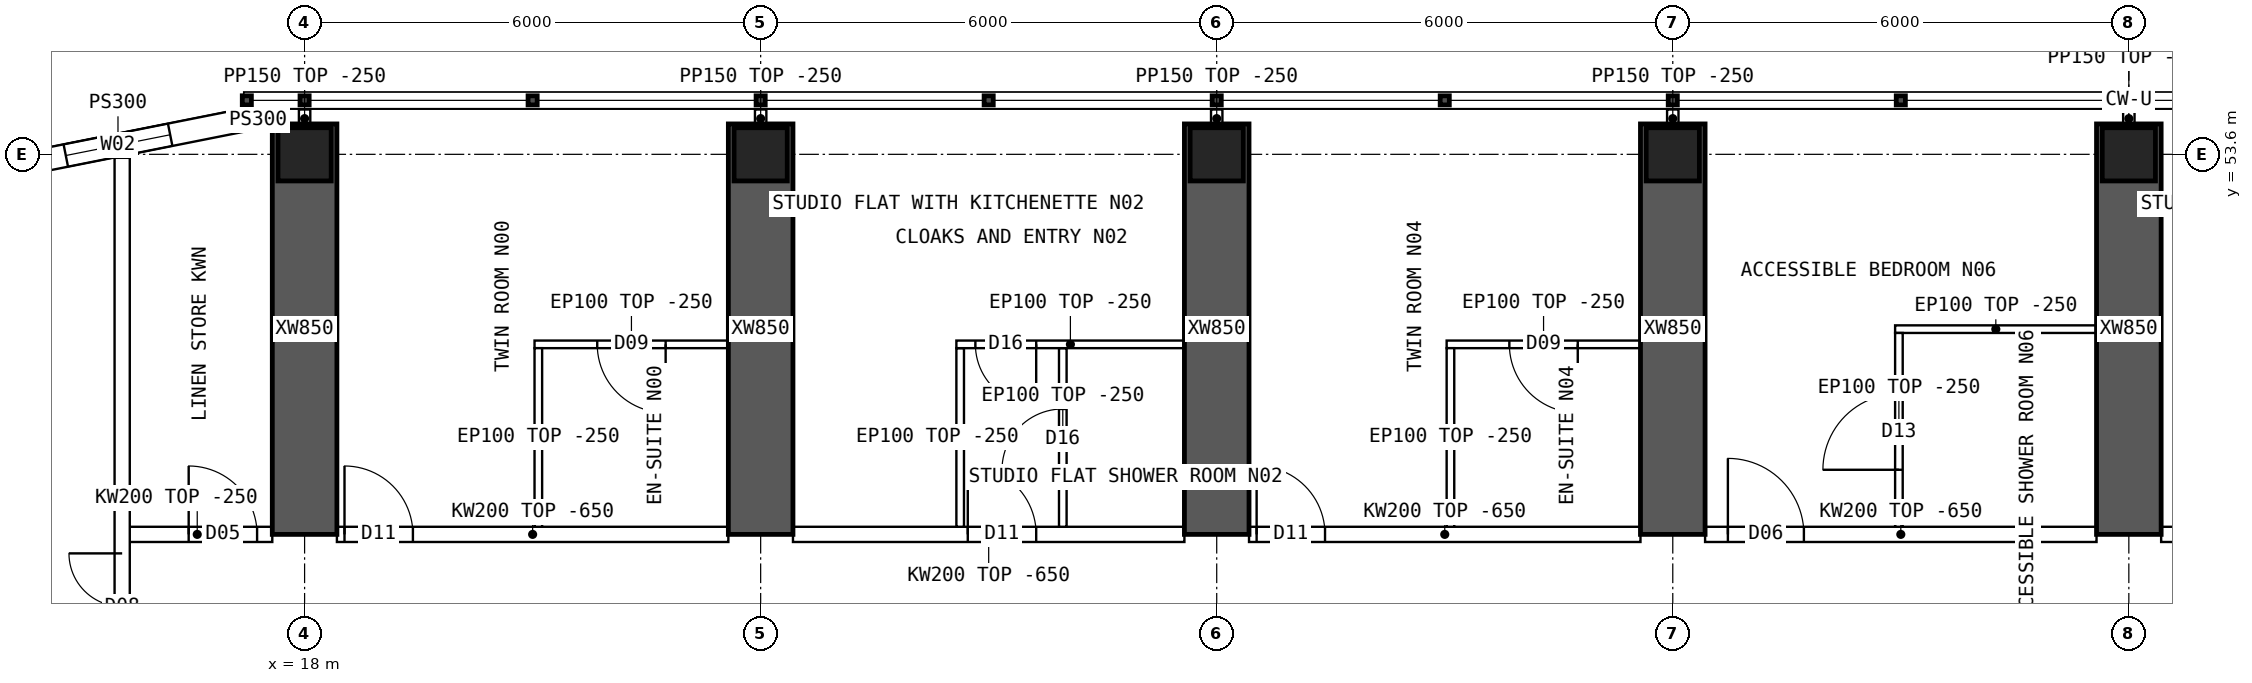
"""IFC4 building model, lengths in metres.
Left out: names, types, materials, properties, quantities, classifications, styles, units other than length and angle.
Written with IfcOpenShell. Run it as: python <this file> out.ifc"""

import sys

from ifc_helpers import new_model, si_unit, direction, frame, frame_2d, origin, origin_2d, place, context, subcontext, project, spatial, polyline, rectangle, hollow_rectangle, outline, extrude, element, fill, save


model = new_model("IFC4")
c1 = context("Model", 3, precision=1e-05, world=origin(), true_north=direction((0.0, 1.0)))
c2 = subcontext(c1, "Body", "Model", "MODEL_VIEW")
j1 = project(units=[si_unit("LENGTHUNIT", "METRE"), si_unit("PLANEANGLEUNIT", "RADIAN")], contexts=[c1])
p1 = place(None, origin())
s1 = spatial("IfcSite", under=j1, at=p1, CompositionType="ELEMENT")
p2 = place(p1, origin())
s2 = spatial("IfcBuilding", under=s1, at=p2, CompositionType="ELEMENT")
p3 = place(p2, frame((0.0, 0.0, 152.35)))
s3 = spatial("IfcBuildingStorey", under=s2, at=p3, CompositionType="ELEMENT", Elevation=152.35)
for number, where, z_axis, x_axis in (
    (1, (18.0, 53.6, 0.0), (0.0, 0.0, 1.0), (1.0, 0.0, 0.0)),
    (2, (24.0, 53.6, 0.0), (0.0, 0.0, 1.0), (1.0, 0.0, 0.0)),
    (3, (30.0, 53.6, 0.0), (0.0, 0.0, 1.0), (1.0, 0.0, 0.0)),
    (4, (36.0, 53.6, 0.0), (0.0, 0.0, 1.0), (1.0, 0.0, 0.0)),
    (5, (42.0, 53.6, 0.0), (0.0, 0.0, 1.0), (1.0, 0.0, 0.0)),
):
    element("IfcColumn", number, at=place(p3, frame(where, z_axis=z_axis, x_axis=x_axis)), inside=s3, PredefinedType="COLUMN", context=c2, shape_type="SweptSolid", body=[
        extrude(hollow_rectangle(XDim=0.7, YDim=0.7, WallThickness=0.07, at=origin_2d()), origin(), (0.0, 0.0, 1.0), 3.75),
    ])
for number, where, z_axis, x_axis in (
    (6, (18.0, 48.6, 0.0), (0.0, 0.0, 1.0), (0.0, 1.0, 0.0)),
    (7, (24.0, 48.6, 0.0), (0.0, 0.0, 1.0), (0.0, 1.0, 0.0)),
    (8, (30.0, 48.6, 0.0), (0.0, 0.0, 1.0), (0.0, 1.0, 0.0)),
    (9, (36.0, 48.6, 0.0), (0.0, 0.0, 1.0), (0.0, 1.0, 0.0)),
    (10, (42.0, 48.6, 0.0), (0.0, 0.0, 1.0), (0.0, 1.0, 0.0)),
):
    element("IfcWall", number, at=place(p3, frame(where, z_axis=z_axis, x_axis=x_axis)), inside=s3, PredefinedType="SHEAR", context=c2, shape_type="SweptSolid", body=[
        extrude(rectangle(XDim=5.4, YDim=0.85, at=frame_2d((2.7, 0.0))), origin(), (0.0, 0.0, 1.0), 3.75),
    ])
p4 = place(p3, frame((17.2, 54.05, 0.0), z_axis=(0.0, 0.0, 1.0), x_axis=(-0.98078325777, -0.195100490205, 0.0)))
e11 = element("IfcWall", 11, at=p4, inside=s3, PredefinedType="SOLIDWALL", context=c2, shape_type="SweptSolid", body=[
    extrude(outline(polyline([(-0.03, -0.15), (3.405, -0.15), (3.345, 0.15), (0.03, 0.15), (-0.03, -0.15)])), origin(), (0.0, 0.0, 1.0), 3.5),
])
p5 = place(p4, frame((0.988, 0.0, 0.9)))
e12 = element("IfcOpeningElement", 12, at=p5, cuts=e11, PredefinedType="OPENING", context=c2, shape_type="SweptSolid", body=[
    extrude(rectangle(XDim=1.4, YDim=1.8, at=frame_2d((0.7, 0.9))), frame((0.0, 0.16, 0.0), z_axis=(0.0, -1.0, 0.0), x_axis=(1.0, 0.0, 0.0)), (0.0, 0.0, 1.0), 0.32),
])
p6 = place(p3, frame((17.2, 54.05, 0.0), z_axis=(0.0, 0.0, 1.0), x_axis=(1.0, 0.0, 0.0)))
e13 = element("IfcWall", 13, at=p6, inside=s3, PredefinedType="SOLIDWALL", context=c2, shape_type="SweptSolid", body=[
    extrude(rectangle(XDim=0.375, YDim=0.3, at=frame_2d((0.188, 0.0))), origin(), (0.0, 0.0, 1.0), 3.5),
])
p7 = place(p3, frame((15.6, 48.6, 0.0), z_axis=(0.0, 0.0, 1.0), x_axis=(1.0, 0.0, 0.0)))
e14 = element("IfcWall", 14, at=p7, inside=s3, PredefinedType="SOLIDWALL", context=c2, shape_type="SweptSolid", body=[
    extrude(rectangle(XDim=1.975, YDim=0.2, at=frame_2d((0.987, 0.0))), origin(), (0.0, 0.0, 1.0), 3.5),
])
p8 = place(p7, frame((0.875, 0.0, 0.0)))
e15 = element("IfcOpeningElement", 15, at=p8, cuts=e14, PredefinedType="OPENING", context=c2, shape_type="SweptSolid", body=[
    extrude(rectangle(XDim=0.9, YDim=2.1, at=frame_2d((0.45, 1.05))), frame((0.0, 0.11, 0.0), z_axis=(0.0, -1.0, 0.0), x_axis=(1.0, 0.0, 0.0)), (0.0, 0.0, 1.0), 0.22),
])
p9 = place(p3, frame((18.425, 48.6, 0.0), z_axis=(0.0, 0.0, 1.0), x_axis=(1.0, 0.0, 0.0)))
e16 = element("IfcWall", 16, at=p9, inside=s3, PredefinedType="SOLIDWALL", context=c2, shape_type="SweptSolid", body=[
    extrude(outline(polyline([(0.0, 0.0), (5.15, 0.0), (5.15, 3.1), (0.0, 3.1), (0.0, 0.0)])), frame((0.0, 0.1, 0.0), z_axis=(0.0, -1.0, 0.0), x_axis=(1.0, 0.0, 0.0)), (0.0, 0.0, 1.0), 0.2),
])
p10 = place(p9, frame((0.1, 0.0, 0.0)))
e17 = element("IfcOpeningElement", 17, at=p10, cuts=e16, PredefinedType="OPENING", context=c2, shape_type="SweptSolid", body=[
    extrude(rectangle(XDim=0.9, YDim=2.1, at=frame_2d((0.45, 1.05))), frame((0.0, 0.11, 0.0), z_axis=(0.0, -1.0, 0.0), x_axis=(1.0, 0.0, 0.0)), (0.0, 0.0, 1.0), 0.22),
])
p11 = place(p3, frame((24.425, 48.6, 0.0), z_axis=(0.0, 0.0, 1.0), x_axis=(1.0, 0.0, 0.0)))
e18 = element("IfcWall", 18, at=p11, inside=s3, PredefinedType="SOLIDWALL", context=c2, shape_type="SweptSolid", body=[
    extrude(outline(polyline([(0.0, 0.0), (5.15, 0.0), (5.15, 3.1), (0.0, 3.1), (0.0, 0.0)])), frame((0.0, 0.1, 0.0), z_axis=(0.0, -1.0, 0.0), x_axis=(1.0, 0.0, 0.0)), (0.0, 0.0, 1.0), 0.2),
])
p12 = place(p11, frame((2.3, 0.0, 0.0)))
e19 = element("IfcOpeningElement", 19, at=p12, cuts=e18, PredefinedType="OPENING", context=c2, shape_type="SweptSolid", body=[
    extrude(rectangle(XDim=0.9, YDim=2.1, at=frame_2d((0.45, 1.05))), frame((0.0, 0.11, 0.0), z_axis=(0.0, -1.0, 0.0), x_axis=(1.0, 0.0, 0.0)), (0.0, 0.0, 1.0), 0.22),
])
p13 = place(p3, frame((30.425, 48.6, 0.0), z_axis=(0.0, 0.0, 1.0), x_axis=(1.0, 0.0, 0.0)))
e20 = element("IfcWall", 20, at=p13, inside=s3, PredefinedType="SOLIDWALL", context=c2, shape_type="SweptSolid", body=[
    extrude(outline(polyline([(0.0, 0.0), (5.15, 0.0), (5.15, 3.1), (0.0, 3.1), (0.0, 0.0)])), frame((0.0, 0.1, 0.0), z_axis=(0.0, -1.0, 0.0), x_axis=(1.0, 0.0, 0.0)), (0.0, 0.0, 1.0), 0.2),
])
p14 = place(p13, frame((0.1, 0.0, 0.0)))
e21 = element("IfcOpeningElement", 21, at=p14, cuts=e20, PredefinedType="OPENING", context=c2, shape_type="SweptSolid", body=[
    extrude(rectangle(XDim=0.9, YDim=2.1, at=frame_2d((0.45, 1.05))), frame((0.0, 0.11, 0.0), z_axis=(0.0, -1.0, 0.0), x_axis=(1.0, 0.0, 0.0)), (0.0, 0.0, 1.0), 0.22),
])
p15 = place(p3, frame((36.425, 48.6, 0.0), z_axis=(0.0, 0.0, 1.0), x_axis=(1.0, 0.0, 0.0)))
e22 = element("IfcWall", 22, at=p15, inside=s3, PredefinedType="SOLIDWALL", context=c2, shape_type="SweptSolid", body=[
    extrude(outline(polyline([(0.0, 0.0), (5.15, 0.0), (5.15, 3.1), (0.0, 3.1), (0.0, 0.0)])), frame((0.0, 0.1, 0.0), z_axis=(0.0, -1.0, 0.0), x_axis=(1.0, 0.0, 0.0)), (0.0, 0.0, 1.0), 0.2),
])
p16 = place(p15, frame((0.3, 0.0, 0.0)))
e23 = element("IfcOpeningElement", 23, at=p16, cuts=e22, PredefinedType="OPENING", context=c2, shape_type="SweptSolid", body=[
    extrude(rectangle(XDim=1.0, YDim=2.1, at=frame_2d((0.5, 1.05))), frame((0.0, 0.11, 0.0), z_axis=(0.0, -1.0, 0.0), x_axis=(1.0, 0.0, 0.0)), (0.0, 0.0, 1.0), 0.22),
])
p17 = place(p3, frame((42.425, 48.6, 0.0), z_axis=(0.0, 0.0, 1.0), x_axis=(1.0, 0.0, 0.0)))
e24 = element("IfcWall", 24, at=p17, inside=s3, PredefinedType="SOLIDWALL", context=c2, shape_type="SweptSolid", body=[
    extrude(outline(polyline([(0.0, 0.0), (5.15, 0.0), (5.15, 3.1), (0.0, 3.1), (0.0, 0.0)])), frame((0.0, 0.1, 0.0), z_axis=(0.0, -1.0, 0.0), x_axis=(1.0, 0.0, 0.0)), (0.0, 0.0, 1.0), 0.2),
])
p18 = place(p17, frame((2.3, 0.0, 0.0)))
e25 = element("IfcOpeningElement", 25, at=p18, cuts=e24, PredefinedType="OPENING", context=c2, shape_type="SweptSolid", body=[
    extrude(rectangle(XDim=0.9, YDim=2.1, at=frame_2d((0.45, 1.05))), frame((0.0, 0.11, 0.0), z_axis=(0.0, -1.0, 0.0), x_axis=(1.0, 0.0, 0.0)), (0.0, 0.0, 1.0), 0.22),
])
p19 = place(p3, frame((21.025, 51.1, 0.0), z_axis=(0.0, 0.0, 1.0), x_axis=(1.0, 0.0, 0.0)))
e26 = element("IfcWall", 26, at=p19, inside=s3, PredefinedType="PARTITIONING", context=c2, shape_type="SweptSolid", body=[
    extrude(rectangle(XDim=2.55, YDim=0.1, at=frame_2d((1.275, 0.0))), origin(), (0.0, 0.0, 1.0), 3.5),
])
p20 = place(p19, frame((0.825, 0.0, 0.0)))
e27 = element("IfcOpeningElement", 27, at=p20, cuts=e26, PredefinedType="OPENING", context=c2, shape_type="SweptSolid", body=[
    extrude(rectangle(XDim=0.9, YDim=2.1, at=frame_2d((0.45, 1.05))), frame((0.0, 0.06, 0.0), z_axis=(0.0, -1.0, 0.0), x_axis=(1.0, 0.0, 0.0)), (0.0, 0.0, 1.0), 0.12),
])
p21 = place(p3, frame((21.075, 51.05, 0.0), z_axis=(0.0, 0.0, 1.0), x_axis=(0.0, -1.0, 0.0)))
e28 = element("IfcWall", 28, at=p21, inside=s3, PredefinedType="PARTITIONING", context=c2, shape_type="SweptSolid", body=[
    extrude(outline(polyline([(0.0, 0.0), (2.35, 0.0), (2.35, 3.1), (2.302, 3.1), (2.3, 3.5), (0.0, 3.5), (0.0, 0.0)])), frame((0.0, 0.05, 0.0), z_axis=(0.0, -1.0, 0.0), x_axis=(1.0, 0.0, 0.0)), (0.0, 0.0, 1.0), 0.1),
])
p22 = place(p3, frame((26.575, 51.1, 0.0), z_axis=(0.0, 0.0, 1.0), x_axis=(1.0, 0.0, 0.0)))
e29 = element("IfcWall", 29, at=p22, inside=s3, PredefinedType="PARTITIONING", context=c2, shape_type="SweptSolid", body=[
    extrude(rectangle(XDim=3.0, YDim=0.1, at=frame_2d((1.5, 0.0))), origin(), (0.0, 0.0, 1.0), 3.5),
])
p23 = place(p22, frame((0.25, 0.0, 0.0)))
e30 = element("IfcOpeningElement", 30, at=p23, cuts=e29, PredefinedType="OPENING", context=c2, shape_type="SweptSolid", body=[
    extrude(rectangle(XDim=0.8, YDim=2.1, at=frame_2d((0.4, 1.05))), frame((0.0, 0.06, 0.0), z_axis=(0.0, -1.0, 0.0), x_axis=(1.0, 0.0, 0.0)), (0.0, 0.0, 1.0), 0.12),
])
p24 = place(p3, frame((26.625, 51.05, 0.0), z_axis=(0.0, 0.0, 1.0), x_axis=(0.0, -1.0, 0.0)))
e31 = element("IfcWall", 31, at=p24, inside=s3, PredefinedType="PARTITIONING", context=c2, shape_type="SweptSolid", body=[
    extrude(outline(polyline([(0.0, 0.0), (2.35, 0.0), (2.35, 3.1), (2.302, 3.1), (2.3, 3.5), (0.0, 3.5), (0.0, 0.0)])), frame((0.0, 0.05, 0.0), z_axis=(0.0, -1.0, 0.0), x_axis=(1.0, 0.0, 0.0)), (0.0, 0.0, 1.0), 0.1),
])
p25 = place(p3, frame((27.975, 51.05, 0.0), z_axis=(0.0, 0.0, 1.0), x_axis=(0.0, -1.0, 0.0)))
e32 = element("IfcWall", 32, at=p25, inside=s3, PredefinedType="PARTITIONING", context=c2, shape_type="SweptSolid", body=[
    extrude(outline(polyline([(0.0, 0.0), (2.35, 0.0), (2.35, 3.1), (2.302, 3.1), (2.3, 3.5), (0.0, 3.5), (0.0, 0.0)])), frame((0.0, 0.05, 0.0), z_axis=(0.0, -1.0, 0.0), x_axis=(1.0, 0.0, 0.0)), (0.0, 0.0, 1.0), 0.1),
])
p26 = place(p25, frame((0.8, 0.0, 0.0)))
e33 = element("IfcOpeningElement", 33, at=p26, cuts=e32, PredefinedType="OPENING", context=c2, shape_type="SweptSolid", body=[
    extrude(rectangle(XDim=0.8, YDim=2.1, at=frame_2d((0.4, 1.05))), frame((0.0, 0.06, 0.0), z_axis=(0.0, -1.0, 0.0), x_axis=(1.0, 0.0, 0.0)), (0.0, 0.0, 1.0), 0.12),
])
p27 = place(p3, frame((33.025, 51.1, 0.0), z_axis=(0.0, 0.0, 1.0), x_axis=(1.0, 0.0, 0.0)))
e34 = element("IfcWall", 34, at=p27, inside=s3, PredefinedType="PARTITIONING", context=c2, shape_type="SweptSolid", body=[
    extrude(rectangle(XDim=2.55, YDim=0.1, at=frame_2d((1.275, 0.0))), origin(), (0.0, 0.0, 1.0), 3.5),
])
p28 = place(p27, frame((0.825, 0.0, 0.0)))
e35 = element("IfcOpeningElement", 35, at=p28, cuts=e34, PredefinedType="OPENING", context=c2, shape_type="SweptSolid", body=[
    extrude(rectangle(XDim=0.9, YDim=2.1, at=frame_2d((0.45, 1.05))), frame((0.0, 0.06, 0.0), z_axis=(0.0, -1.0, 0.0), x_axis=(1.0, 0.0, 0.0)), (0.0, 0.0, 1.0), 0.12),
])
p29 = place(p3, frame((33.075, 51.05, 0.0), z_axis=(0.0, 0.0, 1.0), x_axis=(0.0, -1.0, 0.0)))
e36 = element("IfcWall", 36, at=p29, inside=s3, PredefinedType="PARTITIONING", context=c2, shape_type="SweptSolid", body=[
    extrude(outline(polyline([(0.0, 0.0), (2.35, 0.0), (2.35, 3.1), (2.302, 3.1), (2.3, 3.5), (0.0, 3.5), (0.0, 0.0)])), frame((0.0, 0.05, 0.0), z_axis=(0.0, -1.0, 0.0), x_axis=(1.0, 0.0, 0.0)), (0.0, 0.0, 1.0), 0.1),
])
p30 = place(p3, frame((38.925, 51.3, 0.0), z_axis=(0.0, 0.0, 1.0), x_axis=(1.0, 0.0, 0.0)))
e37 = element("IfcWall", 37, at=p30, inside=s3, PredefinedType="PARTITIONING", context=c2, shape_type="SweptSolid", body=[
    extrude(rectangle(XDim=2.65, YDim=0.1, at=frame_2d((1.325, 0.0))), origin(), (0.0, 0.0, 1.0), 3.5),
])
p31 = place(p3, frame((38.975, 51.25, 0.0), z_axis=(0.0, 0.0, 1.0), x_axis=(0.0, -1.0, 0.0)))
e38 = element("IfcWall", 38, at=p31, inside=s3, PredefinedType="PARTITIONING", context=c2, shape_type="SweptSolid", body=[
    extrude(outline(polyline([(0.0, 0.0), (2.55, 0.0), (2.55, 3.1), (2.502, 3.1), (2.5, 3.5), (0.0, 3.5), (0.0, 0.0)])), frame((0.0, 0.05, 0.0), z_axis=(0.0, -1.0, 0.0), x_axis=(1.0, 0.0, 0.0)), (0.0, 0.0, 1.0), 0.1),
])
p32 = place(p31, frame((0.8, 0.0, 0.0)))
e39 = element("IfcOpeningElement", 39, at=p32, cuts=e38, PredefinedType="OPENING", context=c2, shape_type="SweptSolid", body=[
    extrude(rectangle(XDim=1.0, YDim=2.1, at=frame_2d((0.5, 1.05))), frame((0.0, 0.06, 0.0), z_axis=(0.0, -1.0, 0.0), x_axis=(1.0, 0.0, 0.0)), (0.0, 0.0, 1.0), 0.12),
])
p33 = place(p3, frame((15.6, 10.446, 0.0), z_axis=(0.0, 0.0, 1.0), x_axis=(0.0, 1.0, 0.0)))
e40 = element("IfcWall", 40, at=p33, inside=s3, PredefinedType="SOLIDWALL", context=c2, shape_type="SweptSolid", body=[
    extrude(rectangle(XDim=43.107, YDim=0.2, at=frame_2d((21.554, 0.0))), origin(), (0.0, 0.0, 1.0), 3.5),
])
p34 = place(p33, frame((5.104, 0.0, 0.0)))
e41 = element("IfcOpeningElement", 41, at=p34, cuts=e40, PredefinedType="OPENING", context=c2, shape_type="SweptSolid", body=[
    extrude(rectangle(XDim=1.4, YDim=2.1, at=frame_2d((0.7, 1.05))), frame((0.0, 0.11, 0.0), z_axis=(0.0, -1.0, 0.0), x_axis=(1.0, 0.0, 0.0)), (0.0, 0.0, 1.0), 0.22),
])
p35 = place(p33, frame((36.504, 0.0, 0.0)))
e42 = element("IfcOpeningElement", 42, at=p35, cuts=e40, PredefinedType="OPENING", context=c2, shape_type="SweptSolid", body=[
    extrude(rectangle(XDim=1.4, YDim=2.1, at=frame_2d((0.7, 1.05))), frame((0.0, 0.11, 0.0), z_axis=(0.0, -1.0, 0.0), x_axis=(1.0, 0.0, 0.0)), (0.0, 0.0, 1.0), 0.22),
])
for number, where, z_axis, x_axis in (
    (43, (18.0, 53.95, 0.0), (0.0, 0.0, 1.0), (0.0, 1.0, 0.0)),
    (44, (24.0, 53.95, 0.0), (0.0, 0.0, 1.0), (0.0, 1.0, 0.0)),
    (45, (30.0, 53.95, 0.0), (0.0, 0.0, 1.0), (0.0, 1.0, 0.0)),
    (46, (36.0, 53.95, 0.0), (0.0, 0.0, 1.0), (0.0, 1.0, 0.0)),
    (47, (42.0, 53.95, 0.0), (0.0, 0.0, 1.0), (0.0, 1.0, 0.0)),
):
    element("IfcWall", number, at=place(p3, frame(where, z_axis=z_axis, x_axis=x_axis)), inside=s3, PredefinedType="PARTITIONING", context=c2, shape_type="SweptSolid", body=[
        extrude(rectangle(XDim=0.24, YDim=0.15, at=frame_2d((0.12, 0.0))), origin(), (0.0, 0.0, 1.0), 3.5),
    ])
p36 = place(p5, origin())
e48 = element("IfcWindow", 48, at=p36, inside=s3, PartitioningType="SINGLE_PANEL", PredefinedType="WINDOW", context=c2, shape_type="SweptSolid", body=[
    extrude(rectangle(XDim=1.4, YDim=1.8, at=frame_2d((0.7, 0.9))), frame((0.0, 0.03, 0.0), z_axis=(0.0, -1.0, 0.0), x_axis=(1.0, 0.0, 0.0)), (0.0, 0.0, 1.0), 0.06),
])
fill(e12, e48)
p37 = place(p20, origin())
e49 = element("IfcDoor", 49, at=p37, inside=s3, OperationType="SINGLE_SWING_RIGHT", PredefinedType="DOOR", context=c2, shape_type="SweptSolid", body=[
    extrude(rectangle(XDim=0.9, YDim=2.1, at=frame_2d((0.45, 1.05))), frame((0.0, 0.025, 0.0), z_axis=(0.0, -1.0, 0.0), x_axis=(1.0, 0.0, 0.0)), (0.0, 0.0, 1.0), 0.05),
])
fill(e27, e49)
p38 = place(p10, origin())
e50 = element("IfcDoor", 50, at=p38, inside=s3, OperationType="SINGLE_SWING_LEFT", PredefinedType="DOOR", context=c2, shape_type="SweptSolid", body=[
    extrude(rectangle(XDim=0.9, YDim=2.1, at=frame_2d((0.45, 1.05))), frame((0.0, 0.025, 0.0), z_axis=(0.0, -1.0, 0.0), x_axis=(1.0, 0.0, 0.0)), (0.0, 0.0, 1.0), 0.05),
])
fill(e17, e50)
p39 = place(p23, origin())
e51 = element("IfcDoor", 51, at=p39, inside=s3, OperationType="SINGLE_SWING_RIGHT", PredefinedType="DOOR", context=c2, shape_type="SweptSolid", body=[
    extrude(rectangle(XDim=0.8, YDim=2.1, at=frame_2d((0.4, 1.05))), frame((0.0, 0.025, 0.0), z_axis=(0.0, -1.0, 0.0), x_axis=(1.0, 0.0, 0.0)), (0.0, 0.0, 1.0), 0.05),
])
fill(e30, e51)
p40 = place(p26, origin())
e52 = element("IfcDoor", 52, at=p40, inside=s3, OperationType="SINGLE_SWING_RIGHT", PredefinedType="DOOR", context=c2, shape_type="SweptSolid", body=[
    extrude(rectangle(XDim=0.8, YDim=2.1, at=frame_2d((0.4, 1.05))), frame((0.0, 0.025, 0.0), z_axis=(0.0, -1.0, 0.0), x_axis=(1.0, 0.0, 0.0)), (0.0, 0.0, 1.0), 0.05),
])
fill(e33, e52)
p41 = place(p12, origin())
e53 = element("IfcDoor", 53, at=p41, inside=s3, OperationType="SINGLE_SWING_LEFT", PredefinedType="DOOR", context=c2, shape_type="SweptSolid", body=[
    extrude(rectangle(XDim=0.9, YDim=2.1, at=frame_2d((0.45, 1.05))), frame((0.0, 0.025, 0.0), z_axis=(0.0, -1.0, 0.0), x_axis=(1.0, 0.0, 0.0)), (0.0, 0.0, 1.0), 0.05),
])
fill(e19, e53)
p42 = place(p28, origin())
e54 = element("IfcDoor", 54, at=p42, inside=s3, OperationType="SINGLE_SWING_RIGHT", PredefinedType="DOOR", context=c2, shape_type="SweptSolid", body=[
    extrude(rectangle(XDim=0.9, YDim=2.1, at=frame_2d((0.45, 1.05))), frame((0.0, 0.025, 0.0), z_axis=(0.0, -1.0, 0.0), x_axis=(1.0, 0.0, 0.0)), (0.0, 0.0, 1.0), 0.05),
])
fill(e35, e54)
p43 = place(p14, origin())
e55 = element("IfcDoor", 55, at=p43, inside=s3, OperationType="SINGLE_SWING_LEFT", PredefinedType="DOOR", context=c2, shape_type="SweptSolid", body=[
    extrude(rectangle(XDim=0.9, YDim=2.1, at=frame_2d((0.45, 1.05))), frame((0.0, 0.025, 0.0), z_axis=(0.0, -1.0, 0.0), x_axis=(1.0, 0.0, 0.0)), (0.0, 0.0, 1.0), 0.05),
])
fill(e21, e55)
p44 = place(p32, origin())
e56 = element("IfcDoor", 56, at=p44, inside=s3, OperationType="SINGLE_SWING_RIGHT", PredefinedType="DOOR", context=c2, shape_type="SweptSolid", body=[
    extrude(rectangle(XDim=1.0, YDim=2.1, at=frame_2d((0.5, 1.05))), frame((0.0, 0.025, 0.0), z_axis=(0.0, -1.0, 0.0), x_axis=(1.0, 0.0, 0.0)), (0.0, 0.0, 1.0), 0.05),
])
fill(e39, e56)
p45 = place(p16, origin())
e57 = element("IfcDoor", 57, at=p45, inside=s3, OperationType="SINGLE_SWING_LEFT", PredefinedType="DOOR", context=c2, shape_type="SweptSolid", body=[
    extrude(rectangle(XDim=1.0, YDim=2.1, at=frame_2d((0.5, 1.05))), frame((0.0, 0.025, 0.0), z_axis=(0.0, -1.0, 0.0), x_axis=(1.0, 0.0, 0.0)), (0.0, 0.0, 1.0), 0.05),
])
fill(e23, e57)
p46 = place(p35, origin())
e58 = element("IfcDoor", 58, at=p46, inside=s3, OperationType="DOUBLE_DOOR_SINGLE_SWING", PredefinedType="DOOR", context=c2, shape_type="SweptSolid", body=[
    extrude(rectangle(XDim=1.4, YDim=2.1, at=frame_2d((0.7, 1.05))), frame((0.0, 0.025, 0.0), z_axis=(0.0, -1.0, 0.0), x_axis=(1.0, 0.0, 0.0)), (0.0, 0.0, 1.0), 0.05),
])
fill(e42, e58)
p47 = place(p8, origin())
e59 = element("IfcDoor", 59, at=p47, inside=s3, OperationType="SINGLE_SWING_LEFT", PredefinedType="DOOR", context=c2, shape_type="SweptSolid", body=[
    extrude(rectangle(XDim=0.9, YDim=2.1, at=frame_2d((0.45, 1.05))), frame((0.0, 0.025, 0.0), z_axis=(0.0, -1.0, 0.0), x_axis=(1.0, 0.0, 0.0)), (0.0, 0.0, 1.0), 0.05),
])
fill(e15, e59)
save(model, sys.argv[1])
